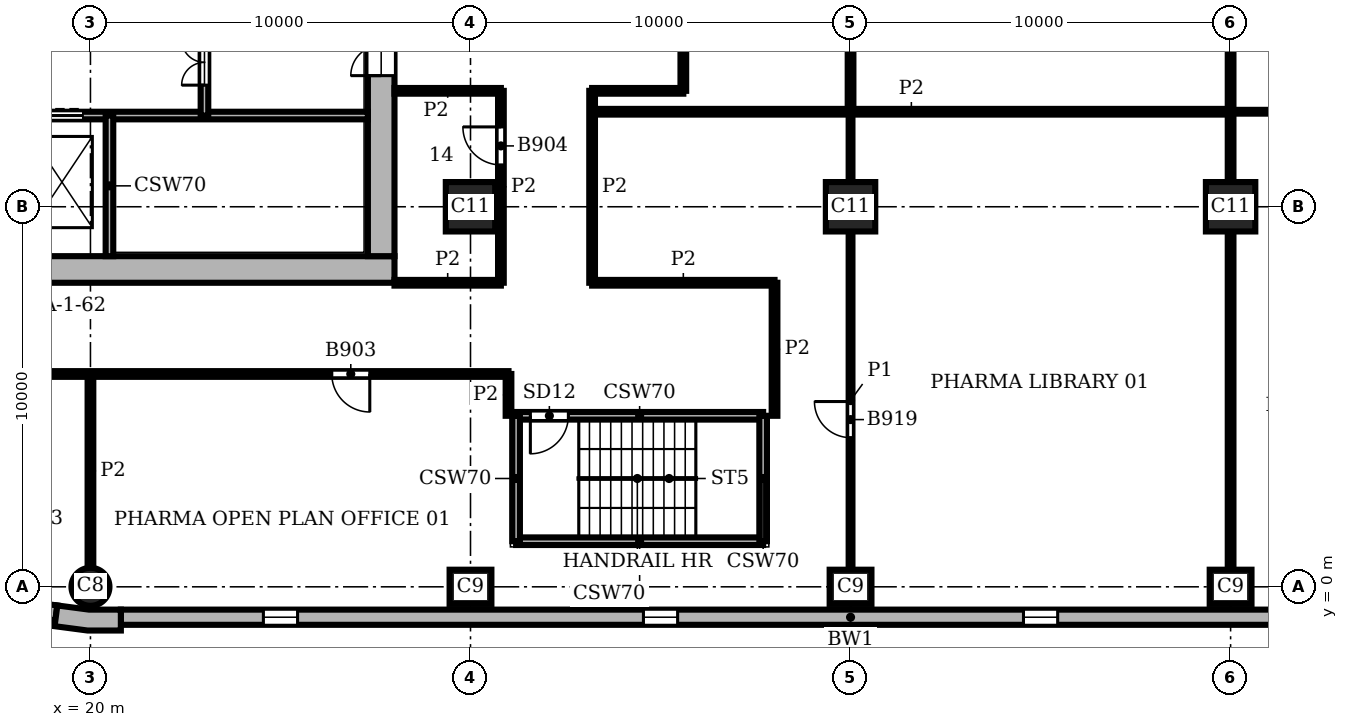
"""IFC4 building model, lengths in metres.
Left out: names, types, materials, properties, quantities, classifications, styles, units other than length and angle.
Written with IfcOpenShell. Run it as: python <this file> out.ifc"""

import sys

from ifc_helpers import new_model, si_unit, direction, frame, frame_2d, origin, origin_2d, place, context, subcontext, project, spatial, polyline, rectangle, circle, outline, extrude, element, fill, save


model = new_model("IFC4")
c1 = context("Model", 3, precision=1e-05, world=origin(), true_north=direction((0.0, 1.0)))
c2 = subcontext(c1, "Body", "Model", "MODEL_VIEW")
j1 = project(units=[si_unit("LENGTHUNIT", "METRE"), si_unit("PLANEANGLEUNIT", "RADIAN")], contexts=[c1])
p1 = place(None, origin())
s1 = spatial("IfcSite", under=j1, at=p1, CompositionType="ELEMENT")
p2 = place(p1, origin())
s2 = spatial("IfcBuilding", under=s1, at=p2, CompositionType="ELEMENT")
p3 = place(p2, frame((0.0, 0.0, 225.3)))
s3 = spatial("IfcBuildingStorey", under=s2, at=p3, CompositionType="ELEMENT", Elevation=225.3)
p4 = place(p3, frame((20.0, 0.0, 0.0), z_axis=(0.0, 0.0, 1.0), x_axis=(1.0, 0.0, 0.0)))
e1 = element("IfcColumn", 1, at=p4, inside=s3, PredefinedType="COLUMN", context=c2, shape_type="SweptSolid", body=[
    extrude(circle(Radius=0.5, at=origin_2d()), origin(), (0.0, 0.0, 1.0), 3.9),
])
for number, where, z_axis, x_axis in (
    (2, (30.0, 0.0, 0.0), (0.0, 0.0, 1.0), (1.0, 0.0, 0.0)),
    (3, (40.0, 0.0, 0.0), (0.0, 0.0, 1.0), (1.0, 0.0, 0.0)),
    (4, (50.0, 0.0, 0.0), (0.0, 0.0, 1.0), (1.0, 0.0, 0.0)),
):
    element("IfcColumn", number, at=place(p3, frame(where, z_axis=z_axis, x_axis=x_axis)), inside=s3, PredefinedType="COLUMN", context=c2, shape_type="SweptSolid", body=[
        extrude(rectangle(XDim=1.1, YDim=0.9, at=origin_2d()), origin(), (0.0, 0.0, 1.0), 3.9),
    ])
for number, where, z_axis, x_axis in (
    (5, (30.0, 10.0, 0.0), (0.0, 0.0, 1.0), (1.0, 0.0, 0.0)),
    (6, (40.0, 10.0, 0.0), (0.0, 0.0, 1.0), (1.0, 0.0, 0.0)),
    (7, (50.0, 10.0, 0.0), (0.0, 0.0, 1.0), (1.0, 0.0, 0.0)),
):
    element("IfcColumn", number, at=place(p3, frame(where, z_axis=z_axis, x_axis=x_axis)), inside=s3, PredefinedType="COLUMN", context=c2, shape_type="SweptSolid", body=[
        extrude(rectangle(XDim=1.3, YDim=1.3, at=origin_2d()), origin(), (0.0, 0.0, 1.0), 3.9),
    ])
p5 = place(p3, frame((8.0, 8.35, 0.0), z_axis=(0.0, 0.0, 1.0), x_axis=(1.0, 0.0, 0.0)))
e8 = element("IfcWall", 8, at=p5, inside=s3, PredefinedType="SHEAR", context=c2, shape_type="SweptSolid", body=[
    extrude(rectangle(XDim=20.0, YDim=0.7, at=frame_2d((10.0, 0.0))), origin(), (0.0, 0.0, 1.0), 3.9),
])
p6 = place(p3, frame((27.65, 8.7, 0.0), z_axis=(0.0, 0.0, 1.0), x_axis=(0.0, 1.0, 0.0)))
e9 = element("IfcWall", 9, at=p6, inside=s3, PredefinedType="SHEAR", context=c2, shape_type="SweptSolid", body=[
    extrude(rectangle(XDim=18.6, YDim=0.7, at=frame_2d((9.3, 0.0))), origin(), (0.0, 0.0, 1.0), 3.9),
])
p7 = place(p6, frame((4.75, 0.0, 0.0)))
e10 = element("IfcOpeningElement", 10, at=p7, cuts=e9, PredefinedType="OPENING", context=c2, shape_type="SweptSolid", body=[
    extrude(rectangle(XDim=1.6, YDim=2.1, at=frame_2d((0.8, 1.05))), frame((0.0, 0.36, 0.0), z_axis=(0.0, -1.0, 0.0), x_axis=(1.0, 0.0, 0.0)), (0.0, 0.0, 1.0), 0.72),
])
p8 = place(p3, origin())
e11 = element("IfcWall", 11, at=p8, inside=s3, PredefinedType="SOLIDWALL", context=c2, shape_type="SweptSolid", body=[
    extrude(outline(polyline([(19.076, -0.887), (19.057, -1.036), (19.925, -1.15), (20.8, -1.15), (20.8, -1.0), (20.8, -0.6), (19.961, -0.6), (19.128, -0.49), (19.076, -0.887)])), origin(), (0.0, 0.0, 1.0), 3.9),
])
p9 = place(p3, frame((20.8, -0.8, 0.0), z_axis=(0.0, 0.0, 1.0), x_axis=(1.0, 0.0, 0.0)))
e12 = element("IfcWall", 12, at=p9, inside=s3, PredefinedType="SOLIDWALL", context=c2, shape_type="SweptSolid", body=[
    extrude(rectangle(XDim=38.4, YDim=0.4, at=frame_2d((19.2, 0.0))), origin(), (0.0, 0.0, 1.0), 3.9),
])
p10 = place(p9, frame((3.75, 0.0, 0.9)))
e13 = element("IfcOpeningElement", 13, at=p10, cuts=e12, PredefinedType="OPENING", context=c2, shape_type="SweptSolid", body=[
    extrude(rectangle(XDim=0.9, YDim=2.35, at=frame_2d((0.45, 1.175))), frame((0.0, 0.21, 0.0), z_axis=(0.0, -1.0, 0.0), x_axis=(1.0, 0.0, 0.0)), (0.0, 0.0, 1.0), 0.42),
])
p11 = place(p9, frame((13.75, 0.0, 0.9)))
e14 = element("IfcOpeningElement", 14, at=p11, cuts=e12, PredefinedType="OPENING", context=c2, shape_type="SweptSolid", body=[
    extrude(rectangle(XDim=0.9, YDim=2.35, at=frame_2d((0.45, 1.175))), frame((0.0, 0.21, 0.0), z_axis=(0.0, -1.0, 0.0), x_axis=(1.0, 0.0, 0.0)), (0.0, 0.0, 1.0), 0.42),
])
p12 = place(p9, frame((23.75, 0.0, 0.9)))
e15 = element("IfcOpeningElement", 15, at=p12, cuts=e12, PredefinedType="OPENING", context=c2, shape_type="SweptSolid", body=[
    extrude(rectangle(XDim=0.9, YDim=2.35, at=frame_2d((0.45, 1.175))), frame((0.0, 0.21, 0.0), z_axis=(0.0, -1.0, 0.0), x_axis=(1.0, 0.0, 0.0)), (0.0, 0.0, 1.0), 0.42),
])
p13 = place(p9, frame((33.75, 0.0, 0.9)))
e16 = element("IfcOpeningElement", 16, at=p13, cuts=e12, PredefinedType="OPENING", context=c2, shape_type="SweptSolid", body=[
    extrude(rectangle(XDim=0.9, YDim=2.35, at=frame_2d((0.45, 1.175))), frame((0.0, 0.21, 0.0), z_axis=(0.0, -1.0, 0.0), x_axis=(1.0, 0.0, 0.0)), (0.0, 0.0, 1.0), 0.42),
])
p14 = place(p3, frame((15.017, -0.151, 0.0), z_axis=(0.0, 0.0, 1.0), x_axis=(0.991446429508, -0.130514280502, 0.0)))
e17 = element("IfcWall", 17, at=p14, inside=s3, PredefinedType="SOLIDWALL", context=c2, shape_type="SweptSolid", body=[
    extrude(rectangle(XDim=4.121, YDim=0.4, at=frame_2d((2.061, 0.0))), origin(), (0.0, 0.0, 1.0), 3.9),
])
p15 = place(p14, frame((1.611, 0.0, 0.9)))
e18 = element("IfcOpeningElement", 18, at=p15, cuts=e17, PredefinedType="OPENING", context=c2, shape_type="SweptSolid", body=[
    extrude(rectangle(XDim=0.9, YDim=2.35, at=frame_2d((0.45, 1.175))), frame((0.0, 0.21, 0.0), z_axis=(0.0, -1.0, 0.0), x_axis=(1.0, 0.0, 0.0)), (0.0, 0.0, 1.0), 0.42),
])
p16 = place(p3, frame((31.2, 1.2, 0.0), z_axis=(0.0, 0.0, 1.0), x_axis=(1.0, 0.0, 0.0)))
e19 = element("IfcWall", 19, at=p16, inside=s3, PredefinedType="SHEAR", context=c2, shape_type="SweptSolid", body=[
    extrude(rectangle(XDim=6.5, YDim=0.2, at=frame_2d((3.25, 0.0))), origin(), (0.0, 0.0, 1.0), 3.58),
])
p17 = place(p3, frame((31.2, 4.5, 0.0), z_axis=(0.0, 0.0, 1.0), x_axis=(1.0, 0.0, 0.0)))
e20 = element("IfcWall", 20, at=p17, inside=s3, PredefinedType="SHEAR", context=c2, shape_type="SweptSolid", body=[
    extrude(rectangle(XDim=6.5, YDim=0.2, at=frame_2d((3.25, 0.0))), origin(), (0.0, 0.0, 1.0), 3.58),
])
p18 = place(p17, frame((0.375, 0.0, 0.0)))
e21 = element("IfcOpeningElement", 21, at=p18, cuts=e20, PredefinedType="OPENING", context=c2, shape_type="SweptSolid", body=[
    extrude(rectangle(XDim=1.0, YDim=2.1, at=frame_2d((0.5, 1.05))), frame((0.0, 0.11, 0.0), z_axis=(0.0, -1.0, 0.0), x_axis=(1.0, 0.0, 0.0)), (0.0, 0.0, 1.0), 0.22),
])
p19 = place(p3, frame((13.8, 12.4, 0.0), z_axis=(0.0, 0.0, 1.0), x_axis=(1.0, 0.0, 0.0)))
e22 = element("IfcWall", 22, at=p19, inside=s3, PredefinedType="SHEAR", context=c2, shape_type="SweptSolid", body=[
    extrude(rectangle(XDim=13.5, YDim=0.2, at=frame_2d((6.75, 0.0))), origin(), (0.0, 0.0, 1.0), 3.58),
])
p20 = place(p19, frame((2.4, 0.0, 0.0)))
e23 = element("IfcOpeningElement", 23, at=p20, cuts=e22, PredefinedType="OPENING", context=c2, shape_type="SweptSolid", body=[
    extrude(rectangle(XDim=1.1, YDim=2.1, at=frame_2d((0.55, 1.05))), frame((0.0, 0.11, 0.0), z_axis=(0.0, -1.0, 0.0), x_axis=(1.0, 0.0, 0.0)), (0.0, 0.0, 1.0), 0.22),
])
p21 = place(p19, frame((4.9, 0.0, 0.0)))
e24 = element("IfcOpeningElement", 24, at=p21, cuts=e22, PredefinedType="OPENING", context=c2, shape_type="SweptSolid", body=[
    extrude(rectangle(XDim=1.1, YDim=2.1, at=frame_2d((0.55, 1.05))), frame((0.0, 0.11, 0.0), z_axis=(0.0, -1.0, 0.0), x_axis=(1.0, 0.0, 0.0)), (0.0, 0.0, 1.0), 0.22),
])
p22 = place(p19, frame((0.2, 0.0, 0.0)))
e25 = element("IfcOpeningElement", 25, at=p22, cuts=e22, PredefinedType="OPENING", context=c2, shape_type="SweptSolid", body=[
    extrude(rectangle(XDim=1.0, YDim=2.1, at=frame_2d((0.5, 1.05))), frame((0.0, 0.11, 0.0), z_axis=(0.0, -1.0, 0.0), x_axis=(1.0, 0.0, 0.0)), (0.0, 0.0, 1.0), 0.22),
])
p23 = place(p3, frame((20.5, 8.7, 0.0), z_axis=(0.0, 0.0, 1.0), x_axis=(0.0, 1.0, 0.0)))
e26 = element("IfcWall", 26, at=p23, inside=s3, PredefinedType="SHEAR", context=c2, shape_type="SweptSolid", body=[
    extrude(rectangle(XDim=3.7, YDim=0.2, at=frame_2d((1.85, 0.0))), origin(), (0.0, 0.0, 1.0), 3.58),
])
p24 = place(p3, frame((23.0, 12.4, 0.0), z_axis=(0.0, 0.0, 1.0), x_axis=(0.0, 1.0, 0.0)))
e27 = element("IfcWall", 27, at=p24, inside=s3, PredefinedType="SHEAR", context=c2, shape_type="SweptSolid", body=[
    extrude(rectangle(XDim=2.8, YDim=0.2, at=frame_2d((1.4, 0.0))), origin(), (0.0, 0.0, 1.0), 3.58),
])
p25 = place(p24, frame((0.8, 0.0, 0.0)))
e28 = element("IfcOpeningElement", 28, at=p25, cuts=e27, PredefinedType="OPENING", context=c2, shape_type="SweptSolid", body=[
    extrude(rectangle(XDim=1.2, YDim=2.1, at=frame_2d((0.6, 1.05))), frame((0.0, 0.11, 0.0), z_axis=(0.0, -1.0, 0.0), x_axis=(1.0, 0.0, 0.0)), (0.0, 0.0, 1.0), 0.22),
])
for number, where, z_axis, x_axis in (
    (29, (31.2, 1.2, 0.0), (0.0, 0.0, 1.0), (0.0, 1.0, 0.0)),
    (30, (37.7, 1.2, 0.0), (0.0, 0.0, 1.0), (0.0, 1.0, 0.0)),
):
    element("IfcWall", number, at=place(p3, frame(where, z_axis=z_axis, x_axis=x_axis)), inside=s3, PredefinedType="SHEAR", context=c2, shape_type="SweptSolid", body=[
        extrude(rectangle(XDim=3.3, YDim=0.2, at=frame_2d((1.65, 0.0))), origin(), (0.0, 0.0, 1.0), 3.58),
    ])
p26 = place(p3, frame((40.0, 0.45, 0.0), z_axis=(0.0, 0.0, 1.0), x_axis=(0.0, 1.0, 0.0)))
e31 = element("IfcWall", 31, at=p26, inside=s3, PredefinedType="PARTITIONING", context=c2, shape_type="SweptSolid", body=[
    extrude(rectangle(XDim=8.9, YDim=0.1, at=frame_2d((4.45, 0.0))), origin(), (0.0, 0.0, 1.0), 3.58),
])
p27 = place(p26, frame((3.475, 0.0, 0.0)))
e32 = element("IfcOpeningElement", 32, at=p27, cuts=e31, PredefinedType="OPENING", context=c2, shape_type="SweptSolid", body=[
    extrude(rectangle(XDim=0.95, YDim=2.1, at=frame_2d((0.475, 1.05))), frame((0.0, 0.06, 0.0), z_axis=(0.0, -1.0, 0.0), x_axis=(1.0, 0.0, 0.0)), (0.0, 0.0, 1.0), 0.12),
])
p28 = place(p3, frame((40.0, 10.65, 0.0), z_axis=(0.0, 0.0, 1.0), x_axis=(0.0, 1.0, 0.0)))
e33 = element("IfcWall", 33, at=p28, inside=s3, PredefinedType="PARTITIONING", context=c2, shape_type="SweptSolid", body=[
    extrude(rectangle(XDim=1.85, YDim=0.1, at=frame_2d((0.925, 0.0))), origin(), (0.0, 0.0, 1.0), 3.58),
])
p29 = place(p3, frame((50.0, 12.5, 0.0), z_axis=(0.0, 0.0, 1.0), x_axis=(1.0, 0.0, 0.0)))
e34 = element("IfcWall", 34, at=p29, inside=s3, PredefinedType="PARTITIONING", context=c2, shape_type="SweptSolid", body=[
    extrude(rectangle(XDim=5.0, YDim=0.1, at=frame_2d((2.5, 0.0))), origin(), (0.0, 0.0, 1.0), 3.58),
])
p30 = place(p3, frame((20.0, 0.5, 0.0), z_axis=(0.0, 0.0, 1.0), x_axis=(0.0, 1.0, 0.0)))
e35 = element("IfcWall", 35, at=p30, inside=s3, PredefinedType="PARTITIONING", context=c2, shape_type="SweptSolid", body=[
    extrude(rectangle(XDim=5.1, YDim=0.15, at=frame_2d((2.55, 0.0))), origin(), (0.0, 0.0, 1.0), 3.58),
])
p31 = place(p3, frame((30.8, 8.001, 0.0), z_axis=(0.0, 0.0, 1.0), x_axis=(0.0, 1.0, 0.0)))
e36 = element("IfcWall", 36, at=p31, inside=s3, PredefinedType="PARTITIONING", context=c2, shape_type="SweptSolid", body=[
    extrude(rectangle(XDim=5.048, YDim=0.15, at=frame_2d((2.524, 0.0))), origin(), (0.0, 0.0, 1.0), 3.58),
])
p32 = place(p31, frame((3.1, 0.0, 0.0)))
e37 = element("IfcOpeningElement", 37, at=p32, cuts=e36, PredefinedType="OPENING", context=c2, shape_type="SweptSolid", body=[
    extrude(rectangle(XDim=1.0, YDim=2.1, at=frame_2d((0.5, 1.05))), frame((0.0, 0.085, 0.0), z_axis=(0.0, -1.0, 0.0), x_axis=(1.0, 0.0, 0.0)), (0.0, 0.0, 1.0), 0.17),
])
p33 = place(p3, frame((31.0, 4.5, 0.0), z_axis=(0.0, 0.0, 1.0), x_axis=(0.0, 1.0, 0.0)))
e38 = element("IfcWall", 38, at=p33, inside=s3, PredefinedType="PARTITIONING", context=c2, shape_type="SweptSolid", body=[
    extrude(rectangle(XDim=1.1, YDim=0.15, at=frame_2d((0.55, 0.0))), origin(), (0.0, 0.0, 1.0), 3.58),
])
p34 = place(p3, frame((33.2, 8.0, 0.0), z_axis=(0.0, 0.0, 1.0), x_axis=(0.0, 1.0, 0.0)))
e39 = element("IfcWall", 39, at=p34, inside=s3, PredefinedType="PARTITIONING", context=c2, shape_type="SweptSolid", body=[
    extrude(rectangle(XDim=5.05, YDim=0.15, at=frame_2d((2.525, 0.0))), origin(), (0.0, 0.0, 1.0), 3.58),
])
p35 = place(p3, frame((35.6, 13.05, 0.0), z_axis=(0.0, 0.0, 1.0), x_axis=(0.0, 1.0, 0.0)))
e40 = element("IfcWall", 40, at=p35, inside=s3, PredefinedType="PARTITIONING", context=c2, shape_type="SweptSolid", body=[
    extrude(rectangle(XDim=2.4, YDim=0.15, at=frame_2d((1.2, 0.0))), origin(), (0.0, 0.0, 1.0), 3.58),
])
p36 = place(p3, frame((38.0, 4.5, 0.0), z_axis=(0.0, 0.0, 1.0), x_axis=(0.0, 1.0, 0.0)))
e41 = element("IfcWall", 41, at=p36, inside=s3, PredefinedType="PARTITIONING", context=c2, shape_type="SweptSolid", body=[
    extrude(rectangle(XDim=3.5, YDim=0.15, at=frame_2d((1.75, 0.0))), origin(), (0.0, 0.0, 1.0), 3.58),
])
p37 = place(p3, frame((40.0, 12.5, 0.0), z_axis=(0.0, 0.0, 1.0), x_axis=(0.0, 1.0, 0.0)))
e42 = element("IfcWall", 42, at=p37, inside=s3, PredefinedType="PARTITIONING", context=c2, shape_type="SweptSolid", body=[
    extrude(rectangle(XDim=6.85, YDim=0.15, at=frame_2d((3.425, 0.0))), origin(), (0.0, 0.0, 1.0), 3.58),
])
p38 = place(p3, frame((50.0, 0.45, 0.0), z_axis=(0.0, 0.0, 1.0), x_axis=(0.0, 1.0, 0.0)))
e43 = element("IfcWall", 43, at=p38, inside=s3, PredefinedType="PARTITIONING", context=c2, shape_type="SweptSolid", body=[
    extrude(rectangle(XDim=8.9, YDim=0.15, at=frame_2d((4.45, 0.0))), origin(), (0.0, 0.0, 1.0), 3.58),
])
p39 = place(p3, frame((50.0, 10.65, 0.0), z_axis=(0.0, 0.0, 1.0), x_axis=(0.0, 1.0, 0.0)))
e44 = element("IfcWall", 44, at=p39, inside=s3, PredefinedType="PARTITIONING", context=c2, shape_type="SweptSolid", body=[
    extrude(rectangle(XDim=8.7, YDim=0.15, at=frame_2d((4.35, 0.0))), origin(), (0.0, 0.0, 1.0), 3.58),
])
p40 = place(p3, frame((5.6, 5.6, 0.0), z_axis=(0.0, 0.0, 1.0), x_axis=(1.0, 0.0, 0.0)))
e45 = element("IfcWall", 45, at=p40, inside=s3, PredefinedType="PARTITIONING", context=c2, shape_type="SweptSolid", body=[
    extrude(rectangle(XDim=25.4, YDim=0.15, at=frame_2d((12.7, 0.0))), origin(), (0.0, 0.0, 1.0), 3.58),
])
p41 = place(p40, frame((20.75, 0.0, 0.0)))
e46 = element("IfcOpeningElement", 46, at=p41, cuts=e45, PredefinedType="OPENING", context=c2, shape_type="SweptSolid", body=[
    extrude(rectangle(XDim=1.0, YDim=2.1, at=frame_2d((0.5, 1.05))), frame((0.0, 0.085, 0.0), z_axis=(0.0, -1.0, 0.0), x_axis=(1.0, 0.0, 0.0)), (0.0, 0.0, 1.0), 0.17),
])
p42 = place(p40, frame((5.35, 0.0, 0.0)))
e47 = element("IfcOpeningElement", 47, at=p42, cuts=e45, PredefinedType="OPENING", context=c2, shape_type="SweptSolid", body=[
    extrude(rectangle(XDim=0.8, YDim=2.1, at=frame_2d((0.4, 1.05))), frame((0.0, 0.085, 0.0), z_axis=(0.0, -1.0, 0.0), x_axis=(1.0, 0.0, 0.0)), (0.0, 0.0, 1.0), 0.17),
])
p43 = place(p40, frame((11.5, 0.0, 0.0)))
e48 = element("IfcOpeningElement", 48, at=p43, cuts=e45, PredefinedType="OPENING", context=c2, shape_type="SweptSolid", body=[
    extrude(rectangle(XDim=0.8, YDim=2.1, at=frame_2d((0.4, 1.05))), frame((0.0, 0.085, 0.0), z_axis=(0.0, -1.0, 0.0), x_axis=(1.0, 0.0, 0.0)), (0.0, 0.0, 1.0), 0.17),
])
p44 = place(p3, frame((28.0, 8.0, 0.0), z_axis=(0.0, 0.0, 1.0), x_axis=(1.0, 0.0, 0.0)))
e49 = element("IfcWall", 49, at=p44, inside=s3, PredefinedType="PARTITIONING", context=c2, shape_type="SweptSolid", body=[
    extrude(rectangle(XDim=2.799, YDim=0.15, at=frame_2d((1.399, 0.0))), origin(), (0.0, 0.0, 1.0), 3.58),
])
p45 = place(p3, frame((33.2, 8.0, 0.0), z_axis=(0.0, 0.0, 1.0), x_axis=(1.0, 0.0, 0.0)))
e50 = element("IfcWall", 50, at=p45, inside=s3, PredefinedType="PARTITIONING", context=c2, shape_type="SweptSolid", body=[
    extrude(rectangle(XDim=4.8, YDim=0.15, at=frame_2d((2.4, 0.0))), origin(), (0.0, 0.0, 1.0), 3.58),
])
p46 = place(p3, frame((33.2, 12.5, 0.0), z_axis=(0.0, 0.0, 1.0), x_axis=(1.0, 0.0, 0.0)))
e51 = element("IfcWall", 51, at=p46, inside=s3, PredefinedType="PARTITIONING", context=c2, shape_type="SweptSolid", body=[
    extrude(rectangle(XDim=16.8, YDim=0.15, at=frame_2d((8.4, 0.0))), origin(), (0.0, 0.0, 1.0), 3.58),
])
p47 = place(p3, frame((28.0, 13.05, 0.0), z_axis=(0.0, 0.0, 1.0), x_axis=(1.0, 0.0, 0.0)))
e52 = element("IfcWall", 52, at=p47, inside=s3, PredefinedType="PARTITIONING", context=c2, shape_type="SweptSolid", body=[
    extrude(rectangle(XDim=2.799, YDim=0.15, at=frame_2d((1.399, 0.0))), origin(), (0.0, 0.0, 1.0), 3.58),
])
p48 = place(p3, frame((33.2, 13.05, 0.0), z_axis=(0.0, 0.0, 1.0), x_axis=(1.0, 0.0, 0.0)))
e53 = element("IfcWall", 53, at=p48, inside=s3, PredefinedType="PARTITIONING", context=c2, shape_type="SweptSolid", body=[
    extrude(rectangle(XDim=2.4, YDim=0.15, at=frame_2d((1.2, 0.0))), origin(), (0.0, 0.0, 1.0), 3.58),
])
p49 = place(p10, origin())
e54 = element("IfcWindow", 54, at=p49, inside=s3, PartitioningType="SINGLE_PANEL", PredefinedType="WINDOW", context=c2, shape_type="SweptSolid", body=[
    extrude(rectangle(XDim=0.9, YDim=2.35, at=frame_2d((0.45, 1.175))), frame((0.0, 0.16, 0.0), z_axis=(0.0, -1.0, 0.0), x_axis=(1.0, 0.0, 0.0)), (0.0, 0.0, 1.0), 0.06),
])
fill(e13, e54)
p50 = place(p11, origin())
e55 = element("IfcWindow", 55, at=p50, inside=s3, PartitioningType="SINGLE_PANEL", PredefinedType="WINDOW", context=c2, shape_type="SweptSolid", body=[
    extrude(rectangle(XDim=0.9, YDim=2.35, at=frame_2d((0.45, 1.175))), frame((0.0, 0.16, 0.0), z_axis=(0.0, -1.0, 0.0), x_axis=(1.0, 0.0, 0.0)), (0.0, 0.0, 1.0), 0.06),
])
fill(e14, e55)
p51 = place(p12, origin())
e56 = element("IfcWindow", 56, at=p51, inside=s3, PartitioningType="SINGLE_PANEL", PredefinedType="WINDOW", context=c2, shape_type="SweptSolid", body=[
    extrude(rectangle(XDim=0.9, YDim=2.35, at=frame_2d((0.45, 1.175))), frame((0.0, 0.16, 0.0), z_axis=(0.0, -1.0, 0.0), x_axis=(1.0, 0.0, 0.0)), (0.0, 0.0, 1.0), 0.06),
])
fill(e15, e56)
p52 = place(p21, origin())
e57 = element("IfcDoor", 57, at=p52, inside=s3, OperationType="DOUBLE_DOOR_SLIDING", PredefinedType="DOOR", context=c2, shape_type="SweptSolid", body=[
    extrude(rectangle(XDim=1.1, YDim=2.1, at=frame_2d((0.55, 1.05))), frame((0.0, 0.025, 0.0), z_axis=(0.0, -1.0, 0.0), x_axis=(1.0, 0.0, 0.0)), (0.0, 0.0, 1.0), 0.05),
])
fill(e24, e57)
p53 = place(p18, frame((1.0, 0.0, 0.0), z_axis=(0.0, 0.0, 1.0), x_axis=(-1.0, 0.0, 0.0)))
e58 = element("IfcDoor", 58, at=p53, inside=s3, OperationType="SINGLE_SWING_RIGHT", PredefinedType="DOOR", context=c2, shape_type="SweptSolid", body=[
    extrude(rectangle(XDim=1.0, YDim=2.1, at=frame_2d((0.5, 1.05))), frame((0.0, 0.025, 0.0), z_axis=(0.0, -1.0, 0.0), x_axis=(1.0, 0.0, 0.0)), (0.0, 0.0, 1.0), 0.05),
])
fill(e21, e58)
p54 = place(p25, origin())
e59 = element("IfcDoor", 59, at=p54, inside=s3, OperationType="DOUBLE_DOOR_SINGLE_SWING", PredefinedType="DOOR", context=c2, shape_type="SweptSolid", body=[
    extrude(rectangle(XDim=1.2, YDim=2.1, at=frame_2d((0.6, 1.05))), frame((0.0, 0.025, 0.0), z_axis=(0.0, -1.0, 0.0), x_axis=(1.0, 0.0, 0.0)), (0.0, 0.0, 1.0), 0.05),
])
fill(e28, e59)
p55 = place(p7, origin())
e60 = element("IfcDoor", 60, at=p55, inside=s3, OperationType="DOUBLE_DOOR_SINGLE_SWING", PredefinedType="DOOR", context=c2, shape_type="SweptSolid", body=[
    extrude(rectangle(XDim=1.6, YDim=2.1, at=frame_2d((0.8, 1.05))), frame((0.0, 0.025, 0.0), z_axis=(0.0, -1.0, 0.0), x_axis=(1.0, 0.0, 0.0)), (0.0, 0.0, 1.0), 0.05),
])
fill(e10, e60)
p56 = place(p41, frame((1.0, 0.0, 0.0), z_axis=(0.0, 0.0, 1.0), x_axis=(-1.0, 0.0, 0.0)))
e61 = element("IfcDoor", 61, at=p56, inside=s3, OperationType="SINGLE_SWING_LEFT", PredefinedType="DOOR", context=c2, shape_type="SweptSolid", body=[
    extrude(rectangle(XDim=1.0, YDim=2.1, at=frame_2d((0.5, 1.05))), frame((0.0, 0.025, 0.0), z_axis=(0.0, -1.0, 0.0), x_axis=(1.0, 0.0, 0.0)), (0.0, 0.0, 1.0), 0.05),
])
fill(e46, e61)
p57 = place(p32, origin())
e62 = element("IfcDoor", 62, at=p57, inside=s3, OperationType="SINGLE_SWING_RIGHT", PredefinedType="DOOR", context=c2, shape_type="SweptSolid", body=[
    extrude(rectangle(XDim=1.0, YDim=2.1, at=frame_2d((0.5, 1.05))), frame((0.0, 0.025, 0.0), z_axis=(0.0, -1.0, 0.0), x_axis=(1.0, 0.0, 0.0)), (0.0, 0.0, 1.0), 0.05),
])
fill(e37, e62)
p58 = place(p27, origin())
e63 = element("IfcDoor", 63, at=p58, inside=s3, OperationType="SINGLE_SWING_RIGHT", PredefinedType="DOOR", context=c2, shape_type="SweptSolid", body=[
    extrude(rectangle(XDim=0.95, YDim=2.1, at=frame_2d((0.475, 1.05))), frame((0.0, 0.025, 0.0), z_axis=(0.0, -1.0, 0.0), x_axis=(1.0, 0.0, 0.0)), (0.0, 0.0, 1.0), 0.05),
])
fill(e32, e63)
save(model, sys.argv[1])
